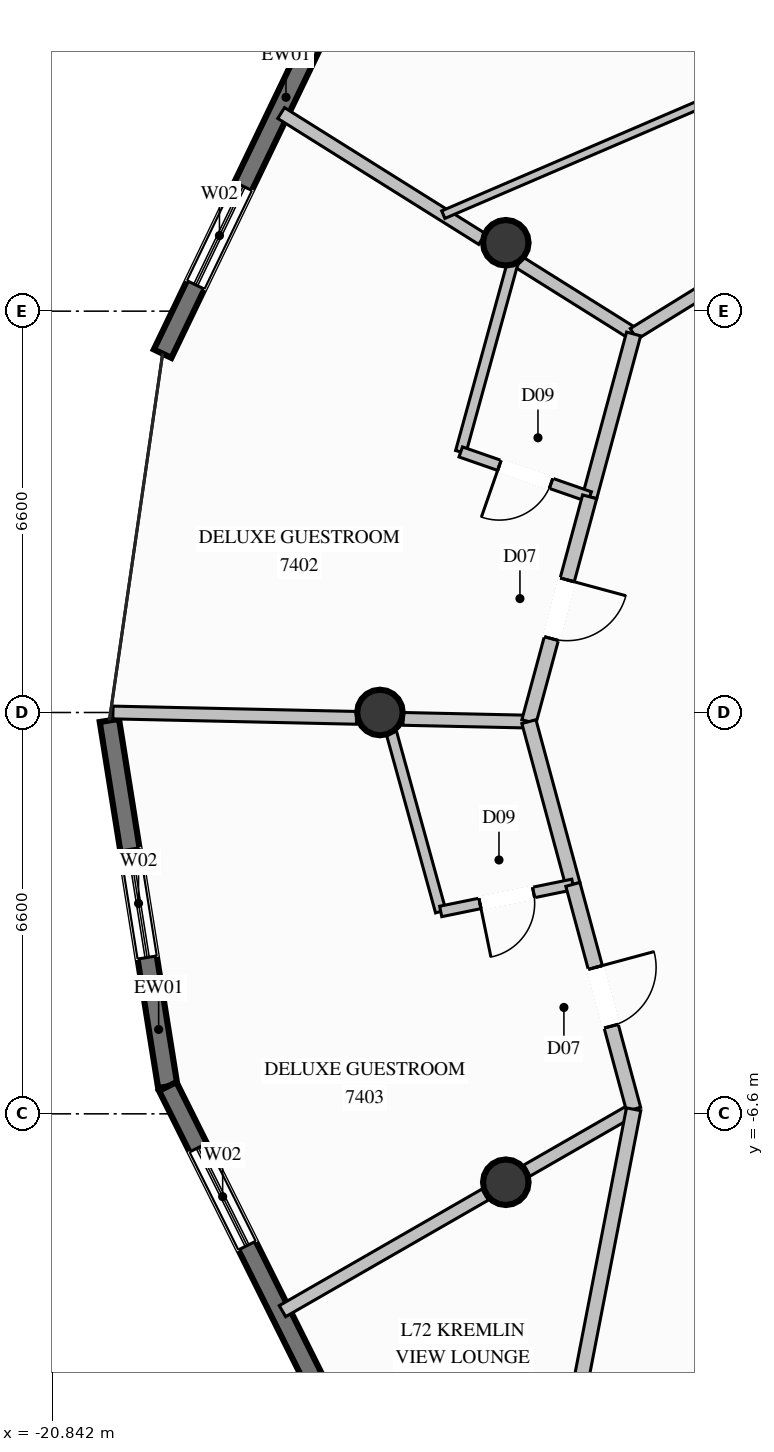
"""IFC4 building model, lengths in metres.
Left out: names, types, materials, properties, quantities, classifications, styles, units other than length and angle.
Written with IfcOpenShell. Run it as: python <this file> out.ifc"""

import sys

from ifc_helpers import new_model, si_unit, direction, frame, frame_2d, origin, origin_2d, place, context, subcontext, project, spatial, rectangle, circle, extrude, element, fill, save


model = new_model("IFC4")
c1 = context("Model", 3, precision=1e-05, world=origin(), true_north=direction((0.0, 1.0)))
c2 = subcontext(c1, "Body", "Model", "MODEL_VIEW")
j1 = project(units=[si_unit("LENGTHUNIT", "METRE"), si_unit("PLANEANGLEUNIT", "RADIAN")], contexts=[c1])
p1 = place(None, origin())
s1 = spatial("IfcSite", under=j1, at=p1, CompositionType="ELEMENT")
p2 = place(p1, origin())
s2 = spatial("IfcBuilding", under=s1, at=p2, CompositionType="ELEMENT")
p3 = place(p2, frame((0.0, 0.0, 278.2)))
s3 = spatial("IfcBuildingStorey", under=s2, at=p3, CompositionType="ELEMENT", Elevation=278.2)
for number, where, z_axis, x_axis in (
    (1, (-13.38, 7.725, 0.0), (0.0, 0.0, 1.0), (1.0, 0.0, 0.0)),
    (2, (-15.45, 0.0, 0.0), (0.0, 0.0, 1.0), (1.0, 0.0, 0.0)),
    (3, (-13.38, -7.725, 0.0), (0.0, 0.0, 1.0), (1.0, 0.0, 0.0)),
):
    element("IfcColumn", number, at=place(p3, frame(where, z_axis=z_axis, x_axis=x_axis)), inside=s3, PredefinedType="COLUMN", context=c2, shape_type="SweptSolid", body=[
        extrude(circle(Radius=0.375, at=origin_2d()), origin(), (0.0, 0.0, 1.0), 3.8),
    ])
p4 = place(p3, frame((-19.024, 5.901, 0.0), z_axis=(0.0, 0.0, 1.0), x_axis=(0.433611899422, 0.901099728487, 0.0)))
e4 = element("IfcWall", 4, at=p4, inside=s3, PredefinedType="SOLIDWALL", context=c2, shape_type="SweptSolid", body=[
    extrude(rectangle(XDim=6.054, YDim=0.32, at=frame_2d((3.027, 0.0))), origin(), (0.0, 0.0, 1.0), 3.57),
])
p5 = place(p4, frame((1.255, 0.0, 0.35)))
e5 = element("IfcOpeningElement", 5, at=p5, cuts=e4, PredefinedType="OPENING", context=c2, shape_type="SweptSolid", body=[
    extrude(rectangle(XDim=1.8, YDim=2.6, at=frame_2d((0.9, 1.3))), frame((0.0, 0.17, 0.0), z_axis=(0.0, -1.0, 0.0), x_axis=(1.0, 0.0, 0.0)), (0.0, 0.0, 1.0), 0.34),
])
p6 = place(p3, frame((-18.94, -6.15, 0.0), z_axis=(0.0, 0.0, 1.0), x_axis=(-0.157503052102, 0.987518500373, 0.0)))
e6 = element("IfcWall", 6, at=p6, inside=s3, PredefinedType="SOLIDWALL", context=c2, shape_type="SweptSolid", body=[
    extrude(rectangle(XDim=6.095, YDim=0.32, at=frame_2d((3.047, 0.0))), origin(), (0.0, 0.0, 1.0), 3.57),
])
p7 = place(p6, frame((2.148, 0.0, 0.35)))
e7 = element("IfcOpeningElement", 7, at=p7, cuts=e6, PredefinedType="OPENING", context=c2, shape_type="SweptSolid", body=[
    extrude(rectangle(XDim=1.8, YDim=2.6, at=frame_2d((0.9, 1.3))), frame((0.0, 0.17, 0.0), z_axis=(0.0, -1.0, 0.0), x_axis=(1.0, 0.0, 0.0)), (0.0, 0.0, 1.0), 0.34),
])
p8 = place(p3, frame((-16.239, -11.567, 0.0), z_axis=(0.0, 0.0, 1.0), x_axis=(-0.44621303713, 0.894926771024, 0.0)))
e8 = element("IfcWall", 8, at=p8, inside=s3, PredefinedType="SOLIDWALL", context=c2, shape_type="SweptSolid", body=[
    extrude(rectangle(XDim=6.053, YDim=0.32, at=frame_2d((3.026, 0.0))), origin(), (0.0, 0.0, 1.0), 3.57),
])
p9 = place(p8, frame((3.129, 0.0, 0.35)))
e9 = element("IfcOpeningElement", 9, at=p9, cuts=e8, PredefinedType="OPENING", context=c2, shape_type="SweptSolid", body=[
    extrude(rectangle(XDim=1.8, YDim=2.6, at=frame_2d((0.9, 1.3))), frame((0.0, 0.17, 0.0), z_axis=(0.0, -1.0, 0.0), x_axis=(1.0, 0.0, 0.0)), (0.0, 0.0, 1.0), 0.34),
])
p10 = place(p3, frame((-11.278, 6.225, 0.0), z_axis=(0.0, 0.0, 1.0), x_axis=(-0.847328563413, 0.531069021525, 0.0)))
e10 = element("IfcWall", 10, at=p10, inside=s3, PredefinedType="PARTITIONING", context=c2, shape_type="SweptSolid", body=[
    extrude(rectangle(XDim=2.214, YDim=0.21, at=frame_2d((1.107, 0.0))), origin(), (0.0, 0.0, 1.0), 3.011),
])
p11 = place(p3, frame((-13.77, 7.787, 0.0), z_axis=(0.0, 0.0, 1.0), x_axis=(-0.847396390163, 0.530960787572, 0.0)))
e11 = element("IfcWall", 11, at=p11, inside=s3, PredefinedType="PARTITIONING", context=c2, shape_type="SweptSolid", body=[
    extrude(rectangle(XDim=3.9, YDim=0.21, at=frame_2d((1.95, 0.0))), origin(), (0.0, 0.0, 1.0), 3.57),
])
p12 = place(p3, frame((-13.0, -0.15, 0.0), z_axis=(0.0, 0.0, 1.0), x_axis=(-0.999764401383, 0.021705799393, 0.0)))
e12 = element("IfcWall", 12, at=p12, inside=s3, PredefinedType="PARTITIONING", context=c2, shape_type="SweptSolid", body=[
    extrude(rectangle(XDim=2.07, YDim=0.21, at=frame_2d((1.035, 0.0))), origin(), (0.0, 0.0, 1.0), 3.57),
])
p13 = place(p3, frame((-15.835, -0.088, 0.0), z_axis=(0.0, 0.0, 1.0), x_axis=(-0.99975942304, 0.021933901657, 0.0)))
e13 = element("IfcWall", 13, at=p13, inside=s3, PredefinedType="PARTITIONING", context=c2, shape_type="SweptSolid", body=[
    extrude(rectangle(XDim=4.007, YDim=0.21, at=frame_2d((2.003, 0.0))), origin(), (0.0, 0.0, 1.0), 3.57),
])
p14 = place(p3, frame((-11.278, -6.525, 0.0), z_axis=(0.0, 0.0, 1.0), x_axis=(-0.86703130414, -0.498253667966, 0.0)))
e14 = element("IfcWall", 14, at=p14, inside=s3, PredefinedType="PARTITIONING", context=c2, shape_type="SweptSolid", body=[
    extrude(rectangle(XDim=2.025, YDim=0.21, at=frame_2d((1.013, 0.0))), origin(), (0.0, 0.0, 1.0), 3.011),
])
p15 = place(p3, frame((-13.719, -7.928, 0.0), z_axis=(0.0, 0.0, 1.0), x_axis=(-0.866911789482, -0.498461582529, 0.0)))
e15 = element("IfcWall", 15, at=p15, inside=s3, PredefinedType="PARTITIONING", context=c2, shape_type="SweptSolid", body=[
    extrude(rectangle(XDim=3.846, YDim=0.21, at=frame_2d((1.923, 0.0))), origin(), (0.0, 0.0, 1.0), 3.57),
])
p16 = place(p3, frame((-11.278, 6.225, 0.0), z_axis=(0.0, 0.0, 1.0), x_axis=(0.85092385233, 0.525289060933, 0.0)))
e16 = element("IfcWall", 16, at=p16, inside=s3, PredefinedType="PARTITIONING", context=c2, shape_type="SweptSolid", body=[
    extrude(rectangle(XDim=4.616, YDim=0.21, at=frame_2d((2.308, 0.0))), origin(), (0.0, 0.0, 1.0), 3.57),
])
p17 = place(p3, frame((-14.408, 8.187, 0.0), z_axis=(0.0, 0.0, 1.0), x_axis=(0.918773394329, 0.394785321247, 0.0)))
e17 = element("IfcWall", 17, at=p17, inside=s3, PredefinedType="PARTITIONING", context=c2, shape_type="SweptSolid", body=[
    extrude(rectangle(XDim=15.682, YDim=0.135, at=frame_2d((7.841, 0.0))), origin(), (0.0, 0.0, 1.0), 3.57),
])
p18 = place(p17, frame((7.366, 0.0, 0.0)))
e18 = element("IfcOpeningElement", 18, at=p18, cuts=e17, PredefinedType="OPENING", context=c2, shape_type="SweptSolid", body=[
    extrude(rectangle(XDim=0.95, YDim=2.1, at=frame_2d((0.475, 1.05))), frame((0.0, 0.078, 0.0), z_axis=(0.0, -1.0, 0.0), x_axis=(1.0, 0.0, 0.0)), (0.0, 0.0, 1.0), 0.155),
])
p19 = place(p3, frame((-11.278, 6.225, 0.0), z_axis=(0.0, 0.0, 1.0), x_axis=(-0.260614169726, -0.965443035367, 0.0)))
e19 = element("IfcWall", 19, at=p19, inside=s3, PredefinedType="PARTITIONING", context=c2, shape_type="SweptSolid", body=[
    extrude(rectangle(XDim=2.774, YDim=0.24, at=frame_2d((1.387, 0.0))), origin(), (0.0, 0.0, 1.0), 3.57),
])
p20 = place(p3, frame((-13.249, 7.46, 0.0), z_axis=(0.0, 0.0, 1.0), x_axis=(-0.264854882297, -0.96428828227, 0.0)))
e20 = element("IfcWall", 20, at=p20, inside=s3, PredefinedType="PLUMBINGWALL", context=c2, shape_type="SweptSolid", body=[
    extrude(rectangle(XDim=3.293, YDim=0.175, at=frame_2d((1.646, 0.0))), origin(), (0.0, 0.0, 1.0), 3.137),
])
p21 = place(p3, frame((-12.001, 3.547, 0.0), z_axis=(0.0, 0.0, 1.0), x_axis=(-0.944446900591, 0.328664041178, 0.0)))
e21 = element("IfcWall", 21, at=p21, inside=s3, PredefinedType="PLUMBINGWALL", context=c2, shape_type="SweptSolid", body=[
    extrude(rectangle(XDim=2.245, YDim=0.175, at=frame_2d((1.123, 0.0))), origin(), (0.0, 0.0, 1.0), 3.57),
])
p22 = place(p21, frame((0.672, 0.0, 0.0)))
e22 = element("IfcOpeningElement", 22, at=p22, cuts=e21, PredefinedType="OPENING", context=c2, shape_type="SweptSolid", body=[
    extrude(rectangle(XDim=0.9, YDim=2.1, at=frame_2d((0.45, 1.05))), frame((0.0, 0.098, 0.0), z_axis=(0.0, -1.0, 0.0), x_axis=(1.0, 0.0, 0.0)), (0.0, 0.0, 1.0), 0.195),
])
p23 = place(p3, frame((-12.001, 3.547, 0.0), z_axis=(0.0, 0.0, 1.0), x_axis=(-0.260867276747, -0.96537467541, 0.0)))
e23 = element("IfcWall", 23, at=p23, inside=s3, PredefinedType="PARTITIONING", context=c2, shape_type="SweptSolid", body=[
    extrude(rectangle(XDim=3.83, YDim=0.24, at=frame_2d((1.915, 0.0))), origin(), (0.0, 0.0, 1.0), 3.57),
])
p24 = place(p23, frame((1.415, 0.0, 0.0)))
e24 = element("IfcOpeningElement", 24, at=p24, cuts=e23, PredefinedType="OPENING", context=c2, shape_type="SweptSolid", body=[
    extrude(rectangle(XDim=1.0, YDim=2.2, at=frame_2d((0.5, 1.1))), frame((0.0, 0.13, 0.0), z_axis=(0.0, -1.0, 0.0), x_axis=(1.0, 0.0, 0.0)), (0.0, 0.0, 1.0), 0.26),
])
p25 = place(p3, frame((-13.0, -0.15, 0.0), z_axis=(0.0, 0.0, 1.0), x_axis=(0.260702780503, -0.965419111183, 0.0)))
e25 = element("IfcWall", 25, at=p25, inside=s3, PredefinedType="PARTITIONING", context=c2, shape_type="SweptSolid", body=[
    extrude(rectangle(XDim=2.773, YDim=0.24, at=frame_2d((1.386, 0.0))), origin(), (0.0, 0.0, 1.0), 3.57),
])
p26 = place(p3, frame((-15.326, -0.099, 0.0), z_axis=(0.0, 0.0, 1.0), x_axis=(0.265852934402, -0.964013598073, 0.0)))
e26 = element("IfcWall", 26, at=p26, inside=s3, PredefinedType="PLUMBINGWALL", context=c2, shape_type="SweptSolid", body=[
    extrude(rectangle(XDim=3.291, YDim=0.175, at=frame_2d((1.646, 0.0))), origin(), (0.0, 0.0, 1.0), 3.137),
])
p27 = place(p3, frame((-12.277, -2.827, 0.0), z_axis=(0.0, 0.0, 1.0), x_axis=(-0.979677603326, -0.200578646773, 0.0)))
e27 = element("IfcWall", 27, at=p27, inside=s3, PredefinedType="PLUMBINGWALL", context=c2, shape_type="SweptSolid", body=[
    extrude(rectangle(XDim=2.219, YDim=0.175, at=frame_2d((1.109, 0.0))), origin(), (0.0, 0.0, 1.0), 3.57),
])
p28 = place(p27, frame((0.66, 0.0, 0.0)))
e28 = element("IfcOpeningElement", 28, at=p28, cuts=e27, PredefinedType="OPENING", context=c2, shape_type="SweptSolid", body=[
    extrude(rectangle(XDim=0.9, YDim=2.1, at=frame_2d((0.45, 1.05))), frame((0.0, 0.098, 0.0), z_axis=(0.0, -1.0, 0.0), x_axis=(1.0, 0.0, 0.0)), (0.0, 0.0, 1.0), 0.195),
])
p29 = place(p3, frame((-12.277, -2.827, 0.0), z_axis=(0.0, 0.0, 1.0), x_axis=(0.260803073576, -0.965392022348, 0.0)))
e29 = element("IfcWall", 29, at=p29, inside=s3, PredefinedType="PARTITIONING", context=c2, shape_type="SweptSolid", body=[
    extrude(rectangle(XDim=3.831, YDim=0.24, at=frame_2d((1.915, 0.0))), origin(), (0.0, 0.0, 1.0), 3.57),
])
p30 = place(p29, frame((1.415, 0.0, 0.0)))
e30 = element("IfcOpeningElement", 30, at=p30, cuts=e29, PredefinedType="OPENING", context=c2, shape_type="SweptSolid", body=[
    extrude(rectangle(XDim=1.0, YDim=2.2, at=frame_2d((0.5, 1.1))), frame((0.0, 0.13, 0.0), z_axis=(0.0, -1.0, 0.0), x_axis=(1.0, 0.0, 0.0)), (0.0, 0.0, 1.0), 0.26),
])
p31 = place(p3, frame((-11.278, -6.525, 0.0), z_axis=(0.0, 0.0, 1.0), x_axis=(-0.190197086903, -0.981745928504, 0.0)))
e31 = element("IfcWall", 31, at=p31, inside=s3, PredefinedType="PARTITIONING", context=c2, shape_type="SweptSolid", body=[
    extrude(rectangle(XDim=5.373, YDim=0.24, at=frame_2d((2.687, 0.0))), origin(), (0.0, 0.0, 1.0), 3.57),
])
p32 = place(p5, origin())
e32 = element("IfcWindow", 32, at=p32, inside=s3, PartitioningType="SINGLE_PANEL", PredefinedType="WINDOW", context=c2, shape_type="SweptSolid", body=[
    extrude(rectangle(XDim=1.8, YDim=2.6, at=frame_2d((0.9, 1.3))), frame((0.0, 0.03, 0.0), z_axis=(0.0, -1.0, 0.0), x_axis=(1.0, 0.0, 0.0)), (0.0, 0.0, 1.0), 0.06),
])
fill(e5, e32)
p33 = place(p7, origin())
e33 = element("IfcWindow", 33, at=p33, inside=s3, PartitioningType="SINGLE_PANEL", PredefinedType="WINDOW", context=c2, shape_type="SweptSolid", body=[
    extrude(rectangle(XDim=1.8, YDim=2.6, at=frame_2d((0.9, 1.3))), frame((0.0, 0.03, 0.0), z_axis=(0.0, -1.0, 0.0), x_axis=(1.0, 0.0, 0.0)), (0.0, 0.0, 1.0), 0.06),
])
fill(e7, e33)
p34 = place(p9, origin())
e34 = element("IfcWindow", 34, at=p34, inside=s3, PartitioningType="SINGLE_PANEL", PredefinedType="WINDOW", context=c2, shape_type="SweptSolid", body=[
    extrude(rectangle(XDim=1.8, YDim=2.6, at=frame_2d((0.9, 1.3))), frame((0.0, 0.03, 0.0), z_axis=(0.0, -1.0, 0.0), x_axis=(1.0, 0.0, 0.0)), (0.0, 0.0, 1.0), 0.06),
])
fill(e9, e34)
p35 = place(p22, origin())
e35 = element("IfcDoor", 35, at=p35, inside=s3, OperationType="SINGLE_SWING_RIGHT", PredefinedType="DOOR", context=c2, shape_type="SweptSolid", body=[
    extrude(rectangle(XDim=0.9, YDim=2.1, at=frame_2d((0.45, 1.05))), frame((0.0, 0.025, 0.0), z_axis=(0.0, -1.0, 0.0), x_axis=(1.0, 0.0, 0.0)), (0.0, 0.0, 1.0), 0.05),
])
fill(e22, e35)
p36 = place(p24, origin())
e36 = element("IfcDoor", 36, at=p36, inside=s3, OperationType="SINGLE_SWING_LEFT", PredefinedType="DOOR", context=c2, shape_type="SweptSolid", body=[
    extrude(rectangle(XDim=1.0, YDim=2.2, at=frame_2d((0.5, 1.1))), frame((0.0, 0.025, 0.0), z_axis=(0.0, -1.0, 0.0), x_axis=(1.0, 0.0, 0.0)), (0.0, 0.0, 1.0), 0.05),
])
fill(e24, e36)
p37 = place(p28, origin())
e37 = element("IfcDoor", 37, at=p37, inside=s3, OperationType="SINGLE_SWING_RIGHT", PredefinedType="DOOR", context=c2, shape_type="SweptSolid", body=[
    extrude(rectangle(XDim=0.9, YDim=2.1, at=frame_2d((0.45, 1.05))), frame((0.0, 0.025, 0.0), z_axis=(0.0, -1.0, 0.0), x_axis=(1.0, 0.0, 0.0)), (0.0, 0.0, 1.0), 0.05),
])
fill(e28, e37)
p38 = place(p30, origin())
e38 = element("IfcDoor", 38, at=p38, inside=s3, OperationType="SINGLE_SWING_LEFT", PredefinedType="DOOR", context=c2, shape_type="SweptSolid", body=[
    extrude(rectangle(XDim=1.0, YDim=2.2, at=frame_2d((0.5, 1.1))), frame((0.0, 0.025, 0.0), z_axis=(0.0, -1.0, 0.0), x_axis=(1.0, 0.0, 0.0)), (0.0, 0.0, 1.0), 0.05),
])
fill(e30, e38)
save(model, sys.argv[1])
